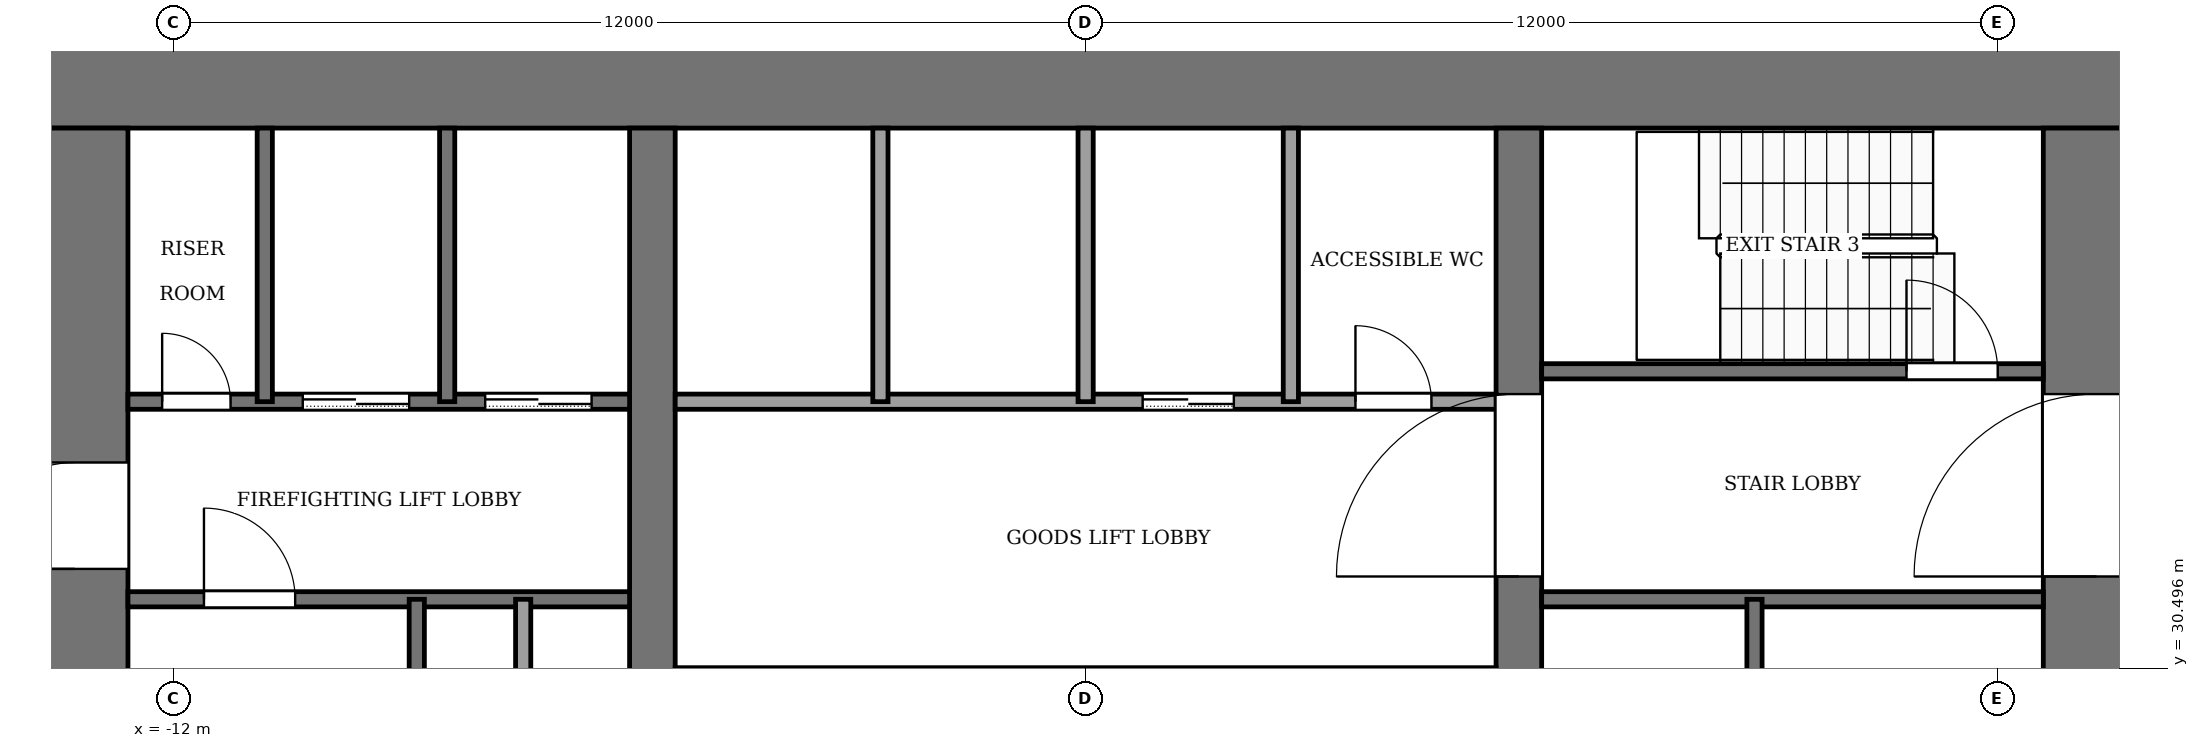
"""IFC4 building model, lengths in metres.
Left out: names, types, materials, properties, quantities, classifications, styles, units other than length and angle.
Written with IfcOpenShell. Run it as: python <this file> out.ifc"""

import sys

from ifc_helpers import new_model, si_unit, direction, frame, frame_2d, origin, place, context, subcontext, project, spatial, rectangle, extrude, element, fill, save


model = new_model("IFC4")
c1 = context("Model", 3, precision=1e-05, world=origin(), true_north=direction((0.0, 1.0)))
c2 = subcontext(c1, "Body", "Model", "MODEL_VIEW")
j1 = project(units=[si_unit("LENGTHUNIT", "METRE"), si_unit("PLANEANGLEUNIT", "RADIAN")], contexts=[c1])
p1 = place(None, origin())
s1 = spatial("IfcSite", under=j1, at=p1, CompositionType="ELEMENT")
p2 = place(p1, origin())
s2 = spatial("IfcBuilding", under=s1, at=p2, CompositionType="ELEMENT")
p3 = place(p2, frame((0.0, 0.0, 18.0)))
s3 = spatial("IfcBuildingStorey", under=s2, at=p3, CompositionType="ELEMENT", Elevation=18.0)
p4 = place(p3, frame((-14.0, 38.3, -0.13), z_axis=(0.0, 0.0, 1.0), x_axis=(1.0, 0.0, 0.0)))
e1 = element("IfcWall", 1, at=p4, inside=s3, PredefinedType="SHEAR", context=c2, shape_type="SweptSolid", body=[
    extrude(rectangle(XDim=28.0, YDim=1.4, at=frame_2d((14.0, 0.0))), origin(), (0.0, 0.0, 1.0), 4.0),
])
p5 = place(p3, frame((-13.3, 18.4, -0.13), z_axis=(0.0, 0.0, 1.0), x_axis=(0.0, 1.0, 0.0)))
e2 = element("IfcWall", 2, at=p5, inside=s3, PredefinedType="SHEAR", context=c2, shape_type="SweptSolid", body=[
    extrude(rectangle(XDim=19.2, YDim=1.4, at=frame_2d((9.6, 0.0))), origin(), (0.0, 0.0, 1.0), 4.0),
])
p6 = place(p5, frame((2.8, 0.0, 0.13)))
e3 = element("IfcOpeningElement", 3, at=p6, cuts=e2, PredefinedType="OPENING", context=c2, shape_type="SweptSolid", body=[
    extrude(rectangle(XDim=2.4, YDim=2.4, at=frame_2d((1.2, 1.2))), frame((0.0, 0.71, 0.0), z_axis=(0.0, -1.0, 0.0), x_axis=(1.0, 0.0, 0.0)), (0.0, 0.0, 1.0), 1.42),
])
p7 = place(p5, frame((13.4, 0.0, 0.13)))
e4 = element("IfcOpeningElement", 4, at=p7, cuts=e2, PredefinedType="OPENING", context=c2, shape_type="SweptSolid", body=[
    extrude(rectangle(XDim=1.4, YDim=2.2, at=frame_2d((0.7, 1.1))), frame((0.0, 0.71, 0.0), z_axis=(0.0, -1.0, 0.0), x_axis=(1.0, 0.0, 0.0)), (0.0, 0.0, 1.0), 1.42),
])
p8 = place(p3, frame((13.3, 18.4, -0.13), z_axis=(0.0, 0.0, 1.0), x_axis=(0.0, 1.0, 0.0)))
e5 = element("IfcWall", 5, at=p8, inside=s3, PredefinedType="SHEAR", context=c2, shape_type="SweptSolid", body=[
    extrude(rectangle(XDim=19.2, YDim=1.4, at=frame_2d((9.6, 0.0))), origin(), (0.0, 0.0, 1.0), 4.0),
])
p9 = place(p8, frame((2.8, 0.0, 0.13)))
e6 = element("IfcOpeningElement", 6, at=p9, cuts=e5, PredefinedType="OPENING", context=c2, shape_type="SweptSolid", body=[
    extrude(rectangle(XDim=2.4, YDim=2.4, at=frame_2d((1.2, 1.2))), frame((0.0, 0.71, 0.0), z_axis=(0.0, -1.0, 0.0), x_axis=(1.0, 0.0, 0.0)), (0.0, 0.0, 1.0), 1.42),
])
p10 = place(p8, frame((13.3, 0.0, 0.13)))
e7 = element("IfcOpeningElement", 7, at=p10, cuts=e5, PredefinedType="OPENING", context=c2, shape_type="SweptSolid", body=[
    extrude(rectangle(XDim=2.4, YDim=2.4, at=frame_2d((1.2, 1.2))), frame((0.0, 0.71, 0.0), z_axis=(0.0, -1.0, 0.0), x_axis=(1.0, 0.0, 0.0)), (0.0, 0.0, 1.0), 1.42),
])
p11 = place(p3, frame((-5.7, 18.4, -0.13), z_axis=(0.0, 0.0, 1.0), x_axis=(0.0, 1.0, 0.0)))
e8 = element("IfcWall", 8, at=p11, inside=s3, PredefinedType="SHEAR", context=c2, shape_type="SweptSolid", body=[
    extrude(rectangle(XDim=19.2, YDim=0.6, at=frame_2d((9.6, 0.0))), origin(), (0.0, 0.0, 1.0), 4.0),
])
p12 = place(p11, frame((8.35, 0.0, 0.13)))
e9 = element("IfcOpeningElement", 9, at=p12, cuts=e8, PredefinedType="OPENING", context=c2, shape_type="SweptSolid", body=[
    extrude(rectangle(XDim=0.9, YDim=2.1, at=frame_2d((0.45, 1.05))), frame((0.0, 0.31, 0.0), z_axis=(0.0, -1.0, 0.0), x_axis=(1.0, 0.0, 0.0)), (0.0, 0.0, 1.0), 0.62),
])
p13 = place(p3, frame((5.7, 18.4, -0.13), z_axis=(0.0, 0.0, 1.0), x_axis=(0.0, 1.0, 0.0)))
e10 = element("IfcWall", 10, at=p13, inside=s3, PredefinedType="SHEAR", context=c2, shape_type="SweptSolid", body=[
    extrude(rectangle(XDim=19.2, YDim=0.6, at=frame_2d((9.6, 0.0))), origin(), (0.0, 0.0, 1.0), 4.0),
])
p14 = place(p13, frame((8.35, 0.0, 0.13)))
e11 = element("IfcOpeningElement", 11, at=p14, cuts=e10, PredefinedType="OPENING", context=c2, shape_type="SweptSolid", body=[
    extrude(rectangle(XDim=0.9, YDim=2.1, at=frame_2d((0.45, 1.05))), frame((0.0, 0.31, 0.0), z_axis=(0.0, -1.0, 0.0), x_axis=(1.0, 0.0, 0.0)), (0.0, 0.0, 1.0), 0.62),
])
p15 = place(p13, frame((13.3, 0.0, 0.13)))
e12 = element("IfcOpeningElement", 12, at=p15, cuts=e10, PredefinedType="OPENING", context=c2, shape_type="SweptSolid", body=[
    extrude(rectangle(XDim=2.4, YDim=2.4, at=frame_2d((1.2, 1.2))), frame((0.0, 0.31, 0.0), z_axis=(0.0, -1.0, 0.0), x_axis=(1.0, 0.0, 0.0)), (0.0, 0.0, 1.0), 0.62),
])
p16 = place(p3, frame((-12.6, 31.4, 0.0), z_axis=(0.0, 0.0, 1.0), x_axis=(1.0, 0.0, 0.0)))
e13 = element("IfcWall", 13, at=p16, inside=s3, PredefinedType="PARTITIONING", context=c2, shape_type="SweptSolid", body=[
    extrude(rectangle(XDim=6.6, YDim=0.2, at=frame_2d((3.3, 0.0))), origin(), (0.0, 0.0, 1.0), 3.87),
])
p17 = place(p16, frame((1.0, 0.0, 0.0)))
e14 = element("IfcOpeningElement", 14, at=p17, cuts=e13, PredefinedType="OPENING", context=c2, shape_type="SweptSolid", body=[
    extrude(rectangle(XDim=1.2, YDim=2.2, at=frame_2d((0.6, 1.1))), frame((0.0, 0.11, 0.0), z_axis=(0.0, -1.0, 0.0), x_axis=(1.0, 0.0, 0.0)), (0.0, 0.0, 1.0), 0.22),
])
p18 = place(p3, frame((6.0, 31.4, 0.0), z_axis=(0.0, 0.0, 1.0), x_axis=(1.0, 0.0, 0.0)))
e15 = element("IfcWall", 15, at=p18, inside=s3, PredefinedType="PARTITIONING", context=c2, shape_type="SweptSolid", body=[
    extrude(rectangle(XDim=6.6, YDim=0.2, at=frame_2d((3.3, 0.0))), origin(), (0.0, 0.0, 1.0), 3.87),
])
p19 = place(p3, frame((-12.6, 34.0, 0.0), z_axis=(0.0, 0.0, 1.0), x_axis=(1.0, 0.0, 0.0)))
e16 = element("IfcWall", 16, at=p19, inside=s3, PredefinedType="PARTITIONING", context=c2, shape_type="SweptSolid", body=[
    extrude(rectangle(XDim=6.6, YDim=0.2, at=frame_2d((3.3, 0.0))), origin(), (0.0, 0.0, 1.0), 3.87),
])
p20 = place(p19, frame((4.7, 0.0, 0.0)))
e17 = element("IfcOpeningElement", 17, at=p20, cuts=e16, PredefinedType="OPENING", context=c2, shape_type="SweptSolid", body=[
    extrude(rectangle(XDim=1.4, YDim=2.2, at=frame_2d((0.7, 1.1))), frame((0.0, 0.11, 0.0), z_axis=(0.0, -1.0, 0.0), x_axis=(1.0, 0.0, 0.0)), (0.0, 0.0, 1.0), 0.22),
])
p21 = place(p19, frame((2.3, 0.0, 0.0)))
e18 = element("IfcOpeningElement", 18, at=p21, cuts=e16, PredefinedType="OPENING", context=c2, shape_type="SweptSolid", body=[
    extrude(rectangle(XDim=1.4, YDim=2.2, at=frame_2d((0.7, 1.1))), frame((0.0, 0.11, 0.0), z_axis=(0.0, -1.0, 0.0), x_axis=(1.0, 0.0, 0.0)), (0.0, 0.0, 1.0), 0.22),
])
p22 = place(p19, frame((0.45, 0.0, 0.0)))
e19 = element("IfcOpeningElement", 19, at=p22, cuts=e16, PredefinedType="OPENING", context=c2, shape_type="SweptSolid", body=[
    extrude(rectangle(XDim=0.9, YDim=2.1, at=frame_2d((0.45, 1.05))), frame((0.0, 0.11, 0.0), z_axis=(0.0, -1.0, 0.0), x_axis=(1.0, 0.0, 0.0)), (0.0, 0.0, 1.0), 0.22),
])
p23 = place(p3, frame((-5.4, 34.0, 0.0), z_axis=(0.0, 0.0, 1.0), x_axis=(1.0, 0.0, 0.0)))
e20 = element("IfcWall", 20, at=p23, inside=s3, PredefinedType="PARTITIONING", context=c2, shape_type="SweptSolid", body=[
    extrude(rectangle(XDim=10.8, YDim=0.2, at=frame_2d((5.4, 0.0))), origin(), (0.0, 0.0, 1.0), 3.87),
])
p24 = place(p23, frame((6.15, 0.0, 0.0)))
e21 = element("IfcOpeningElement", 21, at=p24, cuts=e20, PredefinedType="OPENING", context=c2, shape_type="SweptSolid", body=[
    extrude(rectangle(XDim=1.2, YDim=2.2, at=frame_2d((0.6, 1.1))), frame((0.0, 0.11, 0.0), z_axis=(0.0, -1.0, 0.0), x_axis=(1.0, 0.0, 0.0)), (0.0, 0.0, 1.0), 0.22),
])
p25 = place(p23, frame((8.95, 0.0, 0.0)))
e22 = element("IfcOpeningElement", 22, at=p25, cuts=e20, PredefinedType="OPENING", context=c2, shape_type="SweptSolid", body=[
    extrude(rectangle(XDim=1.0, YDim=2.1, at=frame_2d((0.5, 1.05))), frame((0.0, 0.11, 0.0), z_axis=(0.0, -1.0, 0.0), x_axis=(1.0, 0.0, 0.0)), (0.0, 0.0, 1.0), 0.22),
])
p26 = place(p3, frame((6.0, 34.4, 0.0), z_axis=(0.0, 0.0, 1.0), x_axis=(1.0, 0.0, 0.0)))
e23 = element("IfcWall", 23, at=p26, inside=s3, PredefinedType="PARTITIONING", context=c2, shape_type="SweptSolid", body=[
    extrude(rectangle(XDim=6.6, YDim=0.2, at=frame_2d((3.3, 0.0))), origin(), (0.0, 0.0, 1.0), 3.87),
])
p27 = place(p26, frame((4.8, 0.0, 0.0)))
e24 = element("IfcOpeningElement", 24, at=p27, cuts=e23, PredefinedType="OPENING", context=c2, shape_type="SweptSolid", body=[
    extrude(rectangle(XDim=1.2, YDim=2.2, at=frame_2d((0.6, 1.1))), frame((0.0, 0.11, 0.0), z_axis=(0.0, -1.0, 0.0), x_axis=(1.0, 0.0, 0.0)), (0.0, 0.0, 1.0), 0.22),
])
p28 = place(p3, frame((-10.8, 34.0, 0.0), z_axis=(0.0, 0.0, 1.0), x_axis=(0.0, 1.0, 0.0)))
e25 = element("IfcWall", 25, at=p28, inside=s3, PredefinedType="PARTITIONING", context=c2, shape_type="SweptSolid", body=[
    extrude(rectangle(XDim=3.6, YDim=0.2, at=frame_2d((1.8, 0.0))), origin(), (0.0, 0.0, 1.0), 3.87),
])
p29 = place(p3, frame((-8.8, 24.0, 0.0), z_axis=(0.0, 0.0, 1.0), x_axis=(0.0, 1.0, 0.0)))
e26 = element("IfcWall", 26, at=p29, inside=s3, PredefinedType="PARTITIONING", context=c2, shape_type="SweptSolid", body=[
    extrude(rectangle(XDim=7.4, YDim=0.2, at=frame_2d((3.7, 0.0))), origin(), (0.0, 0.0, 1.0), 3.87),
])
p30 = place(p3, frame((-8.4, 34.0, 0.0), z_axis=(0.0, 0.0, 1.0), x_axis=(0.0, 1.0, 0.0)))
e27 = element("IfcWall", 27, at=p30, inside=s3, PredefinedType="PARTITIONING", context=c2, shape_type="SweptSolid", body=[
    extrude(rectangle(XDim=3.6, YDim=0.2, at=frame_2d((1.8, 0.0))), origin(), (0.0, 0.0, 1.0), 3.87),
])
p31 = place(p3, frame((-7.4, 24.0, 0.0), z_axis=(0.0, 0.0, 1.0), x_axis=(0.0, 1.0, 0.0)))
e28 = element("IfcWall", 28, at=p31, inside=s3, PredefinedType="PARTITIONING", context=c2, shape_type="SweptSolid", body=[
    extrude(rectangle(XDim=7.4, YDim=0.2, at=frame_2d((3.7, 0.0))), origin(), (0.0, 0.0, 1.0), 3.87),
])
for number, where, z_axis, x_axis in (
    (29, (-2.7, 34.0, 0.0), (0.0, 0.0, 1.0), (0.0, 1.0, 0.0)),
    (30, (0.0, 34.0, 0.0), (0.0, 0.0, 1.0), (0.0, 1.0, 0.0)),
    (31, (2.7, 34.0, 0.0), (0.0, 0.0, 1.0), (0.0, 1.0, 0.0)),
):
    element("IfcWall", number, at=place(p3, frame(where, z_axis=z_axis, x_axis=x_axis)), inside=s3, PredefinedType="PARTITIONING", context=c2, shape_type="SweptSolid", body=[
        extrude(rectangle(XDim=3.6, YDim=0.2, at=frame_2d((1.8, 0.0))), origin(), (0.0, 0.0, 1.0), 3.87),
    ])
p32 = place(p3, frame((8.8, 24.0, 0.0), z_axis=(0.0, 0.0, 1.0), x_axis=(0.0, 1.0, 0.0)))
e32 = element("IfcWall", 32, at=p32, inside=s3, PredefinedType="PARTITIONING", context=c2, shape_type="SweptSolid", body=[
    extrude(rectangle(XDim=7.4, YDim=0.2, at=frame_2d((3.7, 0.0))), origin(), (0.0, 0.0, 1.0), 3.87),
])
p33 = place(p24, origin())
e33 = element("IfcDoor", 33, at=p33, inside=s3, OperationType="SLIDING_TO_LEFT", PredefinedType="DOOR", context=c2, shape_type="SweptSolid", body=[
    extrude(rectangle(XDim=1.2, YDim=2.2, at=frame_2d((0.6, 1.1))), frame((0.0, 0.025, 0.0), z_axis=(0.0, -1.0, 0.0), x_axis=(1.0, 0.0, 0.0)), (0.0, 0.0, 1.0), 0.05),
])
fill(e21, e33)
p34 = place(p20, origin())
e34 = element("IfcDoor", 34, at=p34, inside=s3, OperationType="SLIDING_TO_LEFT", PredefinedType="DOOR", context=c2, shape_type="SweptSolid", body=[
    extrude(rectangle(XDim=1.4, YDim=2.2, at=frame_2d((0.7, 1.1))), frame((0.0, 0.025, 0.0), z_axis=(0.0, -1.0, 0.0), x_axis=(1.0, 0.0, 0.0)), (0.0, 0.0, 1.0), 0.05),
])
fill(e17, e34)
p35 = place(p21, origin())
e35 = element("IfcDoor", 35, at=p35, inside=s3, OperationType="SLIDING_TO_LEFT", PredefinedType="DOOR", context=c2, shape_type="SweptSolid", body=[
    extrude(rectangle(XDim=1.4, YDim=2.2, at=frame_2d((0.7, 1.1))), frame((0.0, 0.025, 0.0), z_axis=(0.0, -1.0, 0.0), x_axis=(1.0, 0.0, 0.0)), (0.0, 0.0, 1.0), 0.05),
])
fill(e18, e35)
p36 = place(p22, origin())
e36 = element("IfcDoor", 36, at=p36, inside=s3, OperationType="SINGLE_SWING_RIGHT", PredefinedType="DOOR", context=c2, shape_type="SweptSolid", body=[
    extrude(rectangle(XDim=0.9, YDim=2.1, at=frame_2d((0.45, 1.05))), frame((0.0, 0.025, 0.0), z_axis=(0.0, -1.0, 0.0), x_axis=(1.0, 0.0, 0.0)), (0.0, 0.0, 1.0), 0.05),
])
fill(e19, e36)
p37 = place(p25, origin())
e37 = element("IfcDoor", 37, at=p37, inside=s3, OperationType="SINGLE_SWING_LEFT", PredefinedType="DOOR", context=c2, shape_type="SweptSolid", body=[
    extrude(rectangle(XDim=1.0, YDim=2.1, at=frame_2d((0.5, 1.05))), frame((0.0, 0.025, 0.0), z_axis=(0.0, -1.0, 0.0), x_axis=(1.0, 0.0, 0.0)), (0.0, 0.0, 1.0), 0.05),
])
fill(e22, e37)
p38 = place(p17, origin())
e38 = element("IfcDoor", 38, at=p38, inside=s3, OperationType="SINGLE_SWING_RIGHT", PredefinedType="DOOR", context=c2, shape_type="SweptSolid", body=[
    extrude(rectangle(XDim=1.2, YDim=2.2, at=frame_2d((0.6, 1.1))), frame((0.0, 0.025, 0.0), z_axis=(0.0, -1.0, 0.0), x_axis=(1.0, 0.0, 0.0)), (0.0, 0.0, 1.0), 0.05),
])
fill(e14, e38)
p39 = place(p27, origin())
e39 = element("IfcDoor", 39, at=p39, inside=s3, OperationType="SINGLE_SWING_RIGHT", PredefinedType="DOOR", context=c2, shape_type="SweptSolid", body=[
    extrude(rectangle(XDim=1.2, YDim=2.2, at=frame_2d((0.6, 1.1))), frame((0.0, 0.025, 0.0), z_axis=(0.0, -1.0, 0.0), x_axis=(1.0, 0.0, 0.0)), (0.0, 0.0, 1.0), 0.05),
])
fill(e24, e39)
p40 = place(p15, origin())
e40 = element("IfcDoor", 40, at=p40, inside=s3, OperationType="DOUBLE_DOOR_SINGLE_SWING", PredefinedType="DOOR", context=c2, shape_type="SweptSolid", body=[
    extrude(rectangle(XDim=2.4, YDim=2.4, at=frame_2d((1.2, 1.2))), frame((0.0, 0.025, 0.0), z_axis=(0.0, -1.0, 0.0), x_axis=(1.0, 0.0, 0.0)), (0.0, 0.0, 1.0), 0.05),
])
fill(e12, e40)
p41 = place(p10, origin())
e41 = element("IfcDoor", 41, at=p41, inside=s3, OperationType="DOUBLE_DOOR_SINGLE_SWING", PredefinedType="DOOR", context=c2, shape_type="SweptSolid", body=[
    extrude(rectangle(XDim=2.4, YDim=2.4, at=frame_2d((1.2, 1.2))), frame((0.0, 0.025, 0.0), z_axis=(0.0, -1.0, 0.0), x_axis=(1.0, 0.0, 0.0)), (0.0, 0.0, 1.0), 0.05),
])
fill(e7, e41)
p42 = place(p7, origin())
e42 = element("IfcDoor", 42, at=p42, inside=s3, OperationType="SINGLE_SWING_RIGHT", PredefinedType="DOOR", context=c2, shape_type="SweptSolid", body=[
    extrude(rectangle(XDim=1.4, YDim=2.2, at=frame_2d((0.7, 1.1))), frame((0.0, 0.025, 0.0), z_axis=(0.0, -1.0, 0.0), x_axis=(1.0, 0.0, 0.0)), (0.0, 0.0, 1.0), 0.05),
])
fill(e4, e42)
save(model, sys.argv[1])
